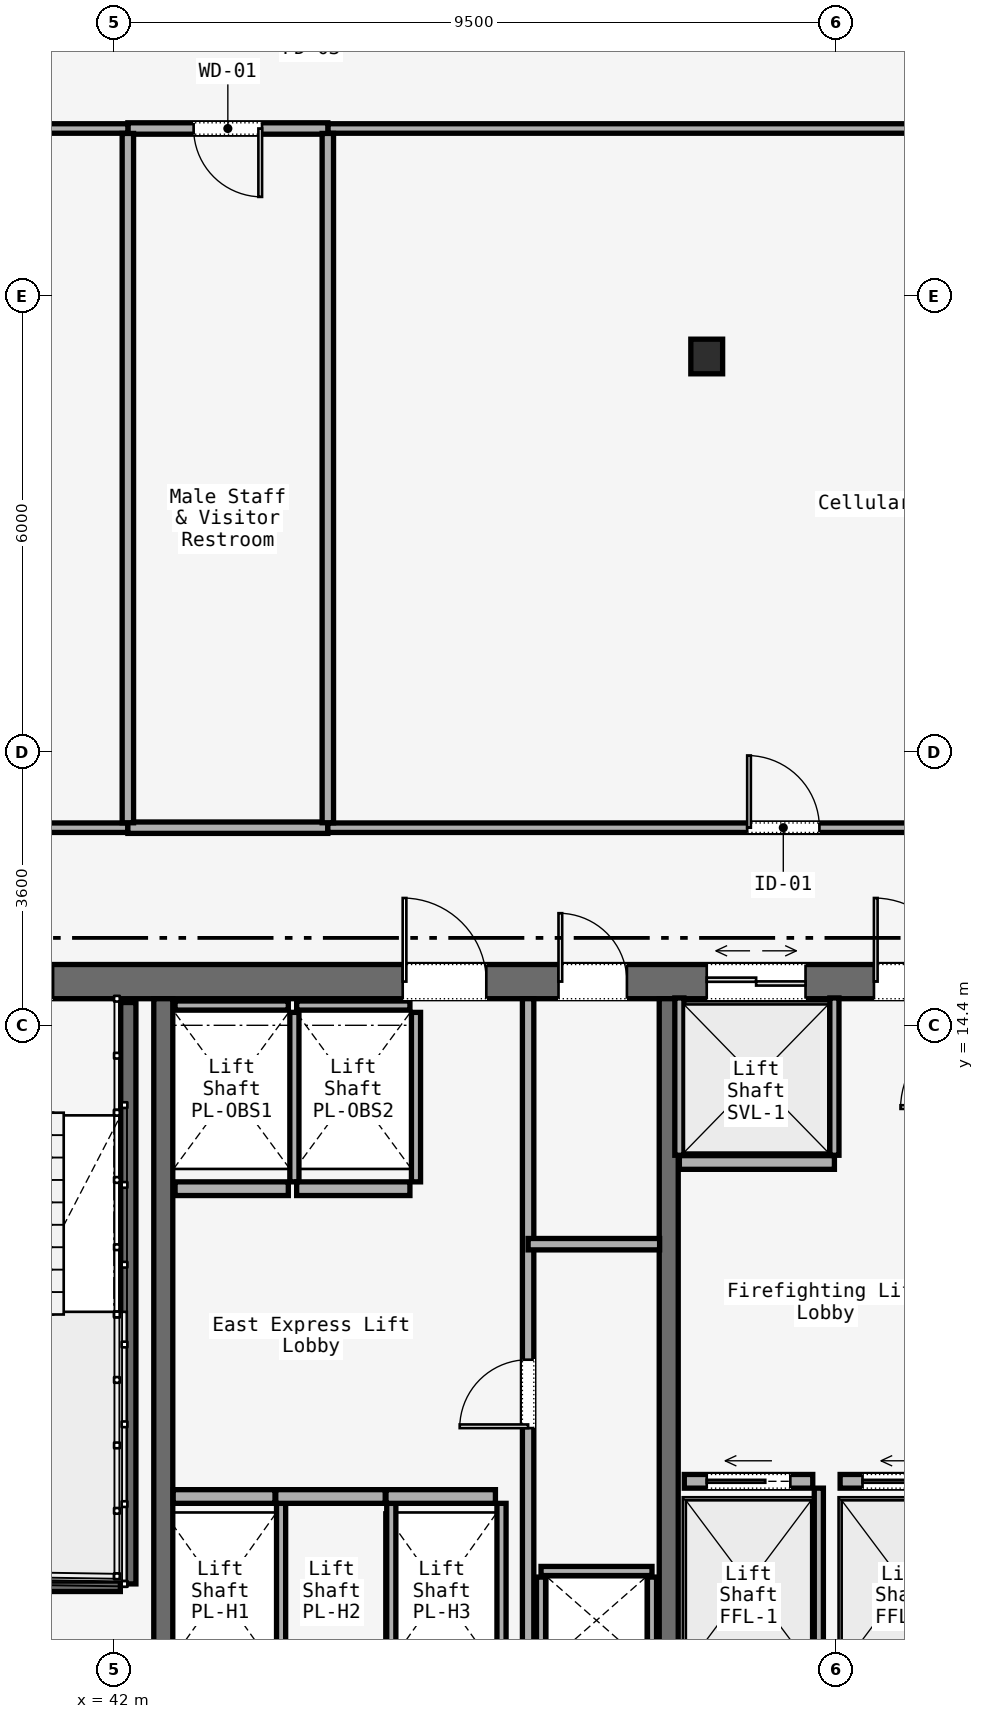
"""IFC4 building model, lengths in metres.
Left out: names, types, materials, properties, quantities, classifications, styles, units other than length and angle.
Written with IfcOpenShell. Run it as: python <this file> out.ifc"""

import sys

from ifc_helpers import new_model, si_unit, direction, frame, frame_2d, origin, origin_2d, place, context, subcontext, project, spatial, rectangle, i_section, extrude, element, fill, save


model = new_model("IFC4")
c1 = context("Model", 3, precision=1e-05, world=origin(), true_north=direction((0.0, 1.0)))
c2 = subcontext(c1, "Body", "Model", "MODEL_VIEW")
j1 = project(units=[si_unit("LENGTHUNIT", "METRE"), si_unit("PLANEANGLEUNIT", "RADIAN")], contexts=[c1])
p1 = place(None, origin())
s1 = spatial("IfcSite", under=j1, at=p1, CompositionType="ELEMENT")
p2 = place(p1, origin())
s2 = spatial("IfcBuilding", under=s1, at=p2, CompositionType="ELEMENT")
p3 = place(p2, frame((0.0, 0.0, 58.8)))
s3 = spatial("IfcBuildingStorey", under=s2, at=p3, CompositionType="ELEMENT", Elevation=58.8)
p4 = place(p3, frame((26.45, 14.975, 0.0), z_axis=(0.0, 0.0, 1.0), x_axis=(1.0, 0.0, 0.0)))
e1 = element("IfcWall", 1, at=p4, inside=s3, PredefinedType="SOLIDWALL", context=c2, shape_type="SweptSolid", body=[
    extrude(rectangle(XDim=31.1, YDim=0.45, at=frame_2d((15.55, 0.0))), origin(), (0.0, 0.0, 1.0), 3.58),
])
p5 = place(p4, frame((1.65, 0.0, 0.0)))
e2 = element("IfcOpeningElement", 2, at=p5, cuts=e1, PredefinedType="OPENING", context=c2, shape_type="SweptSolid", body=[
    extrude(rectangle(XDim=1.1, YDim=2.2, at=frame_2d((0.55, 1.1))), frame((0.0, 0.225, 0.0), z_axis=(0.0, -1.0, 0.0), x_axis=(1.0, 0.0, 0.0)), (0.0, 0.0, 1.0), 0.45),
])
p6 = place(p4, frame((13.65, 0.0, 0.0)))
e3 = element("IfcOpeningElement", 3, at=p6, cuts=e1, PredefinedType="OPENING", context=c2, shape_type="SweptSolid", body=[
    extrude(rectangle(XDim=1.1, YDim=2.2, at=frame_2d((0.55, 1.1))), frame((0.0, 0.225, 0.0), z_axis=(0.0, -1.0, 0.0), x_axis=(1.0, 0.0, 0.0)), (0.0, 0.0, 1.0), 0.45),
])
p7 = place(p4, frame((25.55, 0.0, 0.0)))
e4 = element("IfcOpeningElement", 4, at=p7, cuts=e1, PredefinedType="OPENING", context=c2, shape_type="SweptSolid", body=[
    extrude(rectangle(XDim=1.1, YDim=2.2, at=frame_2d((0.55, 1.1))), frame((0.0, 0.225, 0.0), z_axis=(0.0, -1.0, 0.0), x_axis=(1.0, 0.0, 0.0)), (0.0, 0.0, 1.0), 0.45),
])
p8 = place(p4, frame((10.7, 0.0, 0.0)))
e5 = element("IfcOpeningElement", 5, at=p8, cuts=e1, PredefinedType="OPENING", context=c2, shape_type="SweptSolid", body=[
    extrude(rectangle(XDim=1.4, YDim=2.2, at=frame_2d((0.7, 1.1))), frame((0.0, 0.225, 0.0), z_axis=(0.0, -1.0, 0.0), x_axis=(1.0, 0.0, 0.0)), (0.0, 0.0, 1.0), 0.45),
])
p9 = place(p4, frame((19.35, 0.0, 0.0)))
e6 = element("IfcOpeningElement", 6, at=p9, cuts=e1, PredefinedType="OPENING", context=c2, shape_type="SweptSolid", body=[
    extrude(rectangle(XDim=1.1, YDim=2.2, at=frame_2d((0.55, 1.1))), frame((0.0, 0.225, 0.0), z_axis=(0.0, -1.0, 0.0), x_axis=(1.0, 0.0, 0.0)), (0.0, 0.0, 1.0), 0.45),
])
p10 = place(p4, frame((21.4, 0.0, 0.0)))
e7 = element("IfcOpeningElement", 7, at=p10, cuts=e1, PredefinedType="OPENING", context=c2, shape_type="SweptSolid", body=[
    extrude(rectangle(XDim=0.9, YDim=2.1, at=frame_2d((0.45, 1.05))), frame((0.0, 0.225, 0.0), z_axis=(0.0, -1.0, 0.0), x_axis=(1.0, 0.0, 0.0)), (0.0, 0.0, 1.0), 0.45),
])
p11 = place(p4, frame((23.35, 0.0, 0.0)))
e8 = element("IfcOpeningElement", 8, at=p11, cuts=e1, PredefinedType="OPENING", context=c2, shape_type="SweptSolid", body=[
    extrude(rectangle(XDim=1.3, YDim=2.3, at=frame_2d((0.65, 1.15))), frame((0.0, 0.225, 0.0), z_axis=(0.0, -1.0, 0.0), x_axis=(1.0, 0.0, 0.0)), (0.0, 0.0, 1.0), 0.45),
])
for number, where, z_axis, x_axis in (
    (9, (42.65, 5.85, 0.0), (0.0, 0.0, 1.0), (0.0, 1.0, 0.0)),
    (10, (49.3, 5.85, 0.0), (0.0, 0.0, 1.0), (0.0, 1.0, 0.0)),
):
    element("IfcWall", number, at=place(p3, frame(where, z_axis=z_axis, x_axis=x_axis)), inside=s3, PredefinedType="SOLIDWALL", context=c2, shape_type="SweptSolid", body=[
        extrude(rectangle(XDim=8.9, YDim=0.25, at=frame_2d((4.45, 0.0))), origin(), (0.0, 0.0, 1.0), 3.58),
    ])
p12 = place(p3, frame((49.8, 23.2, 0.0), z_axis=(0.0, 0.0, 1.0), x_axis=(1.0, 0.0, 0.0)))
e11 = element("IfcColumn", 11, at=p12, inside=s3, PredefinedType="COLUMN", context=c2, shape_type="SweptSolid", body=[
    extrude(i_section(OverallWidth=0.418, OverallDepth=0.456, WebThickness=0.042, FlangeThickness=0.067, FilletRadius=0.015, at=origin_2d()), origin(), (0.0, 0.0, 1.0), 3.58),
])
p13 = place(p3, frame((42.19, 14.7, 0.0), z_axis=(0.0, 0.0, 1.0), x_axis=(0.0, -1.0, 0.0)))
e12 = element("IfcWall", 12, at=p13, inside=s3, PredefinedType="SOLIDWALL", context=c2, shape_type="SweptSolid", body=[
    extrude(rectangle(XDim=7.65, YDim=0.2, at=frame_2d((3.825, 0.0))), origin(), (0.0, 0.0, 1.0), 3.8),
])
p14 = place(p3, frame((38.97, 7.05, 0.0), z_axis=(0.0, 0.0, 1.0), x_axis=(1.0, 0.0, 0.0)))
e13 = element("IfcWall", 13, at=p14, inside=s3, PredefinedType="SOLIDWALL", context=c2, shape_type="SweptSolid", body=[
    extrude(rectangle(XDim=3.115, YDim=0.2, at=frame_2d((1.558, 0.0))), origin(), (0.0, 0.0, 1.0), 3.8),
])
p15 = place(p3, frame((47.62, 7.22, 0.0), z_axis=(0.0, 0.0, 1.0), x_axis=(1.0, 0.0, 0.0)))
e14 = element("IfcWall", 14, at=p15, inside=s3, PredefinedType="SOLIDWALL", context=c2, shape_type="SweptSolid", body=[
    extrude(rectangle(XDim=1.46, YDim=0.12, at=frame_2d((0.73, 0.0))), origin(), (0.0, 0.0, 1.0), 2.933),
])
for number, where, z_axis, x_axis in (
    (15, (47.62, 6.0, 0.0), (0.0, 0.0, 1.0), (0.0, 1.0, 0.0)),
    (16, (49.08, 6.0, 0.0), (0.0, 0.0, 1.0), (0.0, 1.0, 0.0)),
):
    element("IfcWall", number, at=place(p3, frame(where, z_axis=z_axis, x_axis=x_axis)), inside=s3, PredefinedType="SOLIDWALL", context=c2, shape_type="SweptSolid", body=[
        extrude(rectangle(XDim=1.14, YDim=0.12, at=frame_2d((0.57, 0.0))), origin(), (0.0, 0.0, 1.0), 2.933),
    ])
p16 = place(p3, frame((47.45, 5.9, 0.0), z_axis=(0.0, 0.0, 1.0), x_axis=(0.0, 1.0, 0.0)))
e17 = element("IfcWall", 17, at=p16, inside=s3, PredefinedType="PARTITIONING", context=c2, shape_type="SweptSolid", body=[
    extrude(rectangle(XDim=8.85, YDim=0.15, at=frame_2d((4.425, 0.0))), origin(), (0.0, 0.0, 1.0), 2.933),
])
p17 = place(p16, frame((3.2, 0.0, 0.0)))
e18 = element("IfcOpeningElement", 18, at=p17, cuts=e17, PredefinedType="OPENING", context=c2, shape_type="SweptSolid", body=[
    extrude(rectangle(XDim=0.9, YDim=2.1, at=frame_2d((0.45, 1.05))), frame((0.0, 0.075, 0.0), z_axis=(0.0, -1.0, 0.0), x_axis=(1.0, 0.0, 0.0)), (0.0, 0.0, 1.0), 0.15),
])
p18 = place(p3, frame((47.45, 11.52, 0.0), z_axis=(0.0, 0.0, 1.0), x_axis=(1.0, 0.0, 0.0)))
e19 = element("IfcWall", 19, at=p18, inside=s3, PredefinedType="PARTITIONING", context=c2, shape_type="SweptSolid", body=[
    extrude(rectangle(XDim=1.73, YDim=0.15, at=frame_2d((0.865, 0.0))), origin(), (0.0, 0.0, 1.0), 2.933),
])
p19 = place(p3, frame((42.78, 8.2, 0.0), z_axis=(0.0, 0.0, 1.0), x_axis=(1.0, 0.0, 0.0)))
e20 = element("IfcWall", 20, at=p19, inside=s3, PredefinedType="SOLIDWALL", context=c2, shape_type="SweptSolid", body=[
    extrude(rectangle(XDim=1.34, YDim=0.18, at=frame_2d((0.67, 0.0))), origin(), (0.0, 0.0, 1.0), 2.933),
])
p20 = place(p3, frame((44.2, 5.93, 0.0), z_axis=(0.0, 0.0, 1.0), x_axis=(0.0, 1.0, 0.0)))
e21 = element("IfcWall", 21, at=p20, inside=s3, PredefinedType="SOLIDWALL", context=c2, shape_type="SweptSolid", body=[
    extrude(rectangle(XDim=2.18, YDim=0.12, at=frame_2d((1.09, 0.0))), origin(), (0.0, 0.0, 1.0), 2.933),
])
p21 = place(p3, frame((44.13, 8.2, 0.0), z_axis=(0.0, 0.0, 1.0), x_axis=(1.0, 0.0, 0.0)))
e22 = element("IfcWall", 22, at=p21, inside=s3, PredefinedType="SOLIDWALL", context=c2, shape_type="SweptSolid", body=[
    extrude(rectangle(XDim=1.44, YDim=0.18, at=frame_2d((0.72, 0.0))), origin(), (0.0, 0.0, 1.0), 2.933),
])
p22 = place(p3, frame((45.65, 5.93, 0.0), z_axis=(0.0, 0.0, 1.0), x_axis=(0.0, 1.0, 0.0)))
e23 = element("IfcWall", 23, at=p22, inside=s3, PredefinedType="SOLIDWALL", context=c2, shape_type="SweptSolid", body=[
    extrude(rectangle(XDim=2.18, YDim=0.12, at=frame_2d((1.09, 0.0))), origin(), (0.0, 0.0, 1.0), 2.933),
])
p23 = place(p3, frame((45.58, 8.2, 0.0), z_axis=(0.0, 0.0, 1.0), x_axis=(1.0, 0.0, 0.0)))
e24 = element("IfcWall", 24, at=p23, inside=s3, PredefinedType="SOLIDWALL", context=c2, shape_type="SweptSolid", body=[
    extrude(rectangle(XDim=1.44, YDim=0.18, at=frame_2d((0.72, 0.0))), origin(), (0.0, 0.0, 1.0), 2.933),
])
p24 = place(p3, frame((47.1, 5.93, 0.0), z_axis=(0.0, 0.0, 1.0), x_axis=(0.0, 1.0, 0.0)))
e25 = element("IfcWall", 25, at=p24, inside=s3, PredefinedType="SOLIDWALL", context=c2, shape_type="SweptSolid", body=[
    extrude(rectangle(XDim=2.18, YDim=0.12, at=frame_2d((1.09, 0.0))), origin(), (0.0, 0.0, 1.0), 2.933),
])
p25 = place(p3, frame((42.805, 12.25, 0.0), z_axis=(0.0, 0.0, 1.0), x_axis=(1.0, 0.0, 0.0)))
e26 = element("IfcWall", 26, at=p25, inside=s3, PredefinedType="SOLIDWALL", context=c2, shape_type="SweptSolid", body=[
    extrude(rectangle(XDim=1.49, YDim=0.18, at=frame_2d((0.745, 0.0))), origin(), (0.0, 0.0, 1.0), 2.933),
])
p26 = place(p3, frame((42.805, 14.66, 0.0), z_axis=(0.0, 0.0, 1.0), x_axis=(1.0, 0.0, 0.0)))
e27 = element("IfcWall", 27, at=p26, inside=s3, PredefinedType="SOLIDWALL", context=c2, shape_type="SweptSolid", body=[
    extrude(rectangle(XDim=1.49, YDim=0.12, at=frame_2d((0.745, 0.0))), origin(), (0.0, 0.0, 1.0), 2.933),
])
p27 = place(p3, frame((44.375, 12.34, 0.0), z_axis=(0.0, 0.0, 1.0), x_axis=(0.0, 1.0, 0.0)))
e28 = element("IfcWall", 28, at=p27, inside=s3, PredefinedType="SOLIDWALL", context=c2, shape_type="SweptSolid", body=[
    extrude(rectangle(XDim=2.23, YDim=0.12, at=frame_2d((1.115, 0.0))), origin(), (0.0, 0.0, 1.0), 2.933),
])
p28 = place(p3, frame((44.405, 12.25, 0.0), z_axis=(0.0, 0.0, 1.0), x_axis=(1.0, 0.0, 0.0)))
e29 = element("IfcWall", 29, at=p28, inside=s3, PredefinedType="SOLIDWALL", context=c2, shape_type="SweptSolid", body=[
    extrude(rectangle(XDim=1.49, YDim=0.18, at=frame_2d((0.745, 0.0))), origin(), (0.0, 0.0, 1.0), 2.933),
])
p29 = place(p3, frame((44.405, 14.66, 0.0), z_axis=(0.0, 0.0, 1.0), x_axis=(1.0, 0.0, 0.0)))
e30 = element("IfcWall", 30, at=p29, inside=s3, PredefinedType="SOLIDWALL", context=c2, shape_type="SweptSolid", body=[
    extrude(rectangle(XDim=1.49, YDim=0.12, at=frame_2d((0.745, 0.0))), origin(), (0.0, 0.0, 1.0), 2.933),
])
p30 = place(p3, frame((45.975, 12.34, 0.0), z_axis=(0.0, 0.0, 1.0), x_axis=(0.0, 1.0, 0.0)))
e31 = element("IfcWall", 31, at=p30, inside=s3, PredefinedType="SOLIDWALL", context=c2, shape_type="SweptSolid", body=[
    extrude(rectangle(XDim=2.23, YDim=0.12, at=frame_2d((1.115, 0.0))), origin(), (0.0, 0.0, 1.0), 2.933),
])
p31 = place(p3, frame((49.505, 8.4, 0.0), z_axis=(0.0, 0.0, 1.0), x_axis=(1.0, 0.0, 0.0)))
e32 = element("IfcWall", 32, at=p31, inside=s3, PredefinedType="SOLIDWALL", context=c2, shape_type="SweptSolid", body=[
    extrude(rectangle(XDim=1.69, YDim=0.18, at=frame_2d((0.845, 0.0))), origin(), (0.0, 0.0, 1.0), 2.933),
])
p32 = place(p31, frame((0.295, 0.0, 0.0)))
e33 = element("IfcOpeningElement", 33, at=p32, cuts=e32, PredefinedType="OPENING", context=c2, shape_type="SweptSolid", body=[
    extrude(rectangle(XDim=1.1, YDim=2.2, at=frame_2d((0.55, 1.1))), frame((0.0, 0.09, 0.0), z_axis=(0.0, -1.0, 0.0), x_axis=(1.0, 0.0, 0.0)), (0.0, 0.0, 1.0), 0.18),
])
p33 = place(p3, frame((51.275, 5.93, 0.0), z_axis=(0.0, 0.0, 1.0), x_axis=(0.0, 1.0, 0.0)))
e34 = element("IfcWall", 34, at=p33, inside=s3, PredefinedType="SOLIDWALL", context=c2, shape_type="SweptSolid", body=[
    extrude(rectangle(XDim=2.38, YDim=0.12, at=frame_2d((1.19, 0.0))), origin(), (0.0, 0.0, 1.0), 2.933),
])
p34 = place(p3, frame((51.555, 8.4, 0.0), z_axis=(0.0, 0.0, 1.0), x_axis=(1.0, 0.0, 0.0)))
e35 = element("IfcWall", 35, at=p34, inside=s3, PredefinedType="SOLIDWALL", context=c2, shape_type="SweptSolid", body=[
    extrude(rectangle(XDim=1.69, YDim=0.18, at=frame_2d((0.845, 0.0))), origin(), (0.0, 0.0, 1.0), 2.933),
])
p35 = place(p34, frame((0.295, 0.0, 0.0)))
e36 = element("IfcOpeningElement", 36, at=p35, cuts=e35, PredefinedType="OPENING", context=c2, shape_type="SweptSolid", body=[
    extrude(rectangle(XDim=1.1, YDim=2.2, at=frame_2d((0.55, 1.1))), frame((0.0, 0.09, 0.0), z_axis=(0.0, -1.0, 0.0), x_axis=(1.0, 0.0, 0.0)), (0.0, 0.0, 1.0), 0.18),
])
p36 = place(p3, frame((49.44, 12.595, 0.0), z_axis=(0.0, 0.0, 1.0), x_axis=(1.0, 0.0, 0.0)))
e37 = element("IfcWall", 37, at=p36, inside=s3, PredefinedType="SOLIDWALL", context=c2, shape_type="SweptSolid", body=[
    extrude(rectangle(XDim=2.04, YDim=0.18, at=frame_2d((1.02, 0.0))), origin(), (0.0, 0.0, 1.0), 2.933),
])
for number, where, z_axis, x_axis in (
    (38, (49.44, 12.69, 0.0), (0.0, 0.0, 1.0), (0.0, 1.0, 0.0)),
    (39, (51.48, 12.69, 0.0), (0.0, 0.0, 1.0), (0.0, 1.0, 0.0)),
):
    element("IfcWall", number, at=place(p3, frame(where, z_axis=z_axis, x_axis=x_axis)), inside=s3, PredefinedType="SOLIDWALL", context=c2, shape_type="SweptSolid", body=[
        extrude(rectangle(XDim=2.07, YDim=0.12, at=frame_2d((1.035, 0.0))), origin(), (0.0, 0.0, 1.0), 2.933),
    ])
p37 = place(p3, frame((56.735, 26.2, 0.0), z_axis=(0.0, 0.0, 1.0), x_axis=(-1.0, 0.0, 0.0)))
e40 = element("IfcWall", 40, at=p37, inside=s3, PredefinedType="PARTITIONING", context=c2, shape_type="SweptSolid", body=[
    extrude(rectangle(XDim=11.92, YDim=0.125, at=frame_2d((5.96, 0.0))), origin(), (0.0, 0.0, 1.0), 2.933),
])
p38 = place(p3, frame((44.815, 26.2, 0.0), z_axis=(0.0, 0.0, 1.0), x_axis=(-1.0, 0.0, 0.0)))
e41 = element("IfcWall", 41, at=p38, inside=s3, PredefinedType="PARTITIONING", context=c2, shape_type="SweptSolid", body=[
    extrude(rectangle(XDim=2.631, YDim=0.15, at=frame_2d((1.315, 0.0))), origin(), (0.0, 0.0, 1.0), 2.933),
])
p39 = place(p38, frame((0.865, 0.0, 0.0)))
e42 = element("IfcOpeningElement", 42, at=p39, cuts=e41, PredefinedType="OPENING", context=c2, shape_type="SweptSolid", body=[
    extrude(rectangle(XDim=0.9, YDim=2.15, at=frame_2d((0.45, 1.075))), frame((0.0, 0.075, 0.0), z_axis=(0.0, -1.0, 0.0), x_axis=(1.0, 0.0, 0.0)), (0.0, 0.0, 1.0), 0.15),
])
p40 = place(p3, frame((42.184, 26.2, 0.0), z_axis=(0.0, 0.0, 1.0), x_axis=(-1.0, 0.0, 0.0)))
e43 = element("IfcWall", 43, at=p40, inside=s3, PredefinedType="PARTITIONING", context=c2, shape_type="SweptSolid", body=[
    extrude(rectangle(XDim=10.584, YDim=0.125, at=frame_2d((5.292, 0.0))), origin(), (0.0, 0.0, 1.0), 2.933),
])
p41 = place(p40, frame((4.817, 0.0, 0.0)))
e44 = element("IfcOpeningElement", 44, at=p41, cuts=e43, PredefinedType="OPENING", context=c2, shape_type="SweptSolid", body=[
    extrude(rectangle(XDim=0.95, YDim=2.2, at=frame_2d((0.475, 1.1))), frame((0.0, 0.062, 0.0), z_axis=(0.0, -1.0, 0.0), x_axis=(1.0, 0.0, 0.0)), (0.0, 0.0, 1.0), 0.125),
])
p42 = place(p3, frame((31.665, 17.0, 0.0), z_axis=(0.0, 0.0, 1.0), x_axis=(1.0, 0.0, 0.0)))
e45 = element("IfcWall", 45, at=p42, inside=s3, PredefinedType="PARTITIONING", context=c2, shape_type="SweptSolid", body=[
    extrude(rectangle(XDim=10.519, YDim=0.125, at=frame_2d((5.26, 0.0))), origin(), (0.0, 0.0, 1.0), 2.933),
])
p43 = place(p3, frame((42.184, 17.0, 0.0), z_axis=(0.0, 0.0, 1.0), x_axis=(1.0, 0.0, 0.0)))
e46 = element("IfcWall", 46, at=p43, inside=s3, PredefinedType="PARTITIONING", context=c2, shape_type="SweptSolid", body=[
    extrude(rectangle(XDim=2.631, YDim=0.15, at=frame_2d((1.315, 0.0))), origin(), (0.0, 0.0, 1.0), 2.933),
])
p44 = place(p3, frame((44.815, 17.0, 0.0), z_axis=(0.0, 0.0, 1.0), x_axis=(1.0, 0.0, 0.0)))
e47 = element("IfcWall", 47, at=p44, inside=s3, PredefinedType="PARTITIONING", context=c2, shape_type="SweptSolid", body=[
    extrude(rectangle(XDim=11.985, YDim=0.125, at=frame_2d((5.993, 0.0))), origin(), (0.0, 0.0, 1.0), 2.933),
])
p45 = place(p44, frame((5.518, 0.0, 0.0)))
e48 = element("IfcOpeningElement", 48, at=p45, cuts=e47, PredefinedType="OPENING", context=c2, shape_type="SweptSolid", body=[
    extrude(rectangle(XDim=0.95, YDim=2.2, at=frame_2d((0.475, 1.1))), frame((0.0, 0.062, 0.0), z_axis=(0.0, -1.0, 0.0), x_axis=(1.0, 0.0, 0.0)), (0.0, 0.0, 1.0), 0.125),
])
for number, where, z_axis, x_axis in (
    (49, (42.184, 26.135, 0.0), (0.0, 0.0, 1.0), (0.0, -1.0, 0.0)),
    (50, (44.815, 26.135, 0.0), (0.0, 0.0, 1.0), (0.0, -1.0, 0.0)),
):
    element("IfcWall", number, at=place(p3, frame(where, z_axis=z_axis, x_axis=x_axis)), inside=s3, PredefinedType="PARTITIONING", context=c2, shape_type="SweptSolid", body=[
        extrude(rectangle(XDim=9.07, YDim=0.15, at=frame_2d((4.535, 0.0))), origin(), (0.0, 0.0, 1.0), 2.933),
    ])
p46 = place(p6, origin())
e51 = element("IfcDoor", 51, at=p46, inside=s3, OperationType="SINGLE_SWING_RIGHT", PredefinedType="DOOR", context=c2, shape_type="SweptSolid", body=[
    extrude(rectangle(XDim=1.1, YDim=2.2, at=frame_2d((0.55, 1.1))), frame((0.0, 0.025, 0.0), z_axis=(0.0, -1.0, 0.0), x_axis=(1.0, 0.0, 0.0)), (0.0, 0.0, 1.0), 0.05),
])
fill(e3, e51)
p47 = place(p7, origin())
e52 = element("IfcDoor", 52, at=p47, inside=s3, OperationType="SINGLE_SWING_RIGHT", PredefinedType="DOOR", context=c2, shape_type="SweptSolid", body=[
    extrude(rectangle(XDim=1.1, YDim=2.2, at=frame_2d((0.55, 1.1))), frame((0.0, 0.025, 0.0), z_axis=(0.0, -1.0, 0.0), x_axis=(1.0, 0.0, 0.0)), (0.0, 0.0, 1.0), 0.05),
])
fill(e4, e52)
p48 = place(p9, origin())
e53 = element("IfcDoor", 53, at=p48, inside=s3, OperationType="SINGLE_SWING_LEFT", PredefinedType="DOOR", context=c2, shape_type="SweptSolid", body=[
    extrude(rectangle(XDim=1.1, YDim=2.2, at=frame_2d((0.55, 1.1))), frame((0.0, 0.025, 0.0), z_axis=(0.0, -1.0, 0.0), x_axis=(1.0, 0.0, 0.0)), (0.0, 0.0, 1.0), 0.05),
])
fill(e6, e53)
p49 = place(p10, origin())
e54 = element("IfcDoor", 54, at=p49, inside=s3, OperationType="SINGLE_SWING_LEFT", PredefinedType="DOOR", context=c2, shape_type="SweptSolid", body=[
    extrude(rectangle(XDim=0.9, YDim=2.1, at=frame_2d((0.45, 1.05))), frame((0.0, 0.025, 0.0), z_axis=(0.0, -1.0, 0.0), x_axis=(1.0, 0.0, 0.0)), (0.0, 0.0, 1.0), 0.05),
])
fill(e7, e54)
p50 = place(p17, origin())
e55 = element("IfcDoor", 55, at=p50, inside=s3, OperationType="SINGLE_SWING_LEFT", PredefinedType="DOOR", context=c2, shape_type="SweptSolid", body=[
    extrude(rectangle(XDim=0.9, YDim=2.1, at=frame_2d((0.45, 1.05))), frame((0.0, 0.025, 0.0), z_axis=(0.0, -1.0, 0.0), x_axis=(1.0, 0.0, 0.0)), (0.0, 0.0, 1.0), 0.05),
])
fill(e18, e55)
p51 = place(p32, origin())
e56 = element("IfcDoor", 56, at=p51, inside=s3, OperationType="SLIDING_TO_LEFT", PredefinedType="DOOR", context=c2, shape_type="SweptSolid", body=[
    extrude(rectangle(XDim=1.1, YDim=2.2, at=frame_2d((0.55, 1.1))), frame((0.0, 0.025, 0.0), z_axis=(0.0, -1.0, 0.0), x_axis=(1.0, 0.0, 0.0)), (0.0, 0.0, 1.0), 0.05),
])
fill(e33, e56)
p52 = place(p35, origin())
e57 = element("IfcDoor", 57, at=p52, inside=s3, OperationType="SLIDING_TO_LEFT", PredefinedType="DOOR", context=c2, shape_type="SweptSolid", body=[
    extrude(rectangle(XDim=1.1, YDim=2.2, at=frame_2d((0.55, 1.1))), frame((0.0, 0.025, 0.0), z_axis=(0.0, -1.0, 0.0), x_axis=(1.0, 0.0, 0.0)), (0.0, 0.0, 1.0), 0.05),
])
fill(e36, e57)
p53 = place(p11, origin())
e58 = element("IfcDoor", 58, at=p53, inside=s3, OperationType="DOUBLE_DOOR_SLIDING", PredefinedType="DOOR", context=c2, shape_type="SweptSolid", body=[
    extrude(rectangle(XDim=1.3, YDim=2.3, at=frame_2d((0.65, 1.15))), frame((0.0, 0.025, 0.0), z_axis=(0.0, -1.0, 0.0), x_axis=(1.0, 0.0, 0.0)), (0.0, 0.0, 1.0), 0.05),
])
fill(e8, e58)
p54 = place(p39, origin())
e59 = element("IfcDoor", 59, at=p54, inside=s3, OperationType="SINGLE_SWING_LEFT", PredefinedType="DOOR", context=c2, shape_type="SweptSolid", body=[
    extrude(rectangle(XDim=0.9, YDim=2.15, at=frame_2d((0.45, 1.075))), frame((0.0, 0.025, 0.0), z_axis=(0.0, -1.0, 0.0), x_axis=(1.0, 0.0, 0.0)), (0.0, 0.0, 1.0), 0.05),
])
fill(e42, e59)
p55 = place(p45, origin())
e60 = element("IfcDoor", 60, at=p55, inside=s3, OperationType="SINGLE_SWING_RIGHT", PredefinedType="DOOR", context=c2, shape_type="SweptSolid", body=[
    extrude(rectangle(XDim=0.95, YDim=2.2, at=frame_2d((0.475, 1.1))), frame((0.0, 0.025, 0.0), z_axis=(0.0, -1.0, 0.0), x_axis=(1.0, 0.0, 0.0)), (0.0, 0.0, 1.0), 0.05),
])
fill(e48, e60)
save(model, sys.argv[1])
